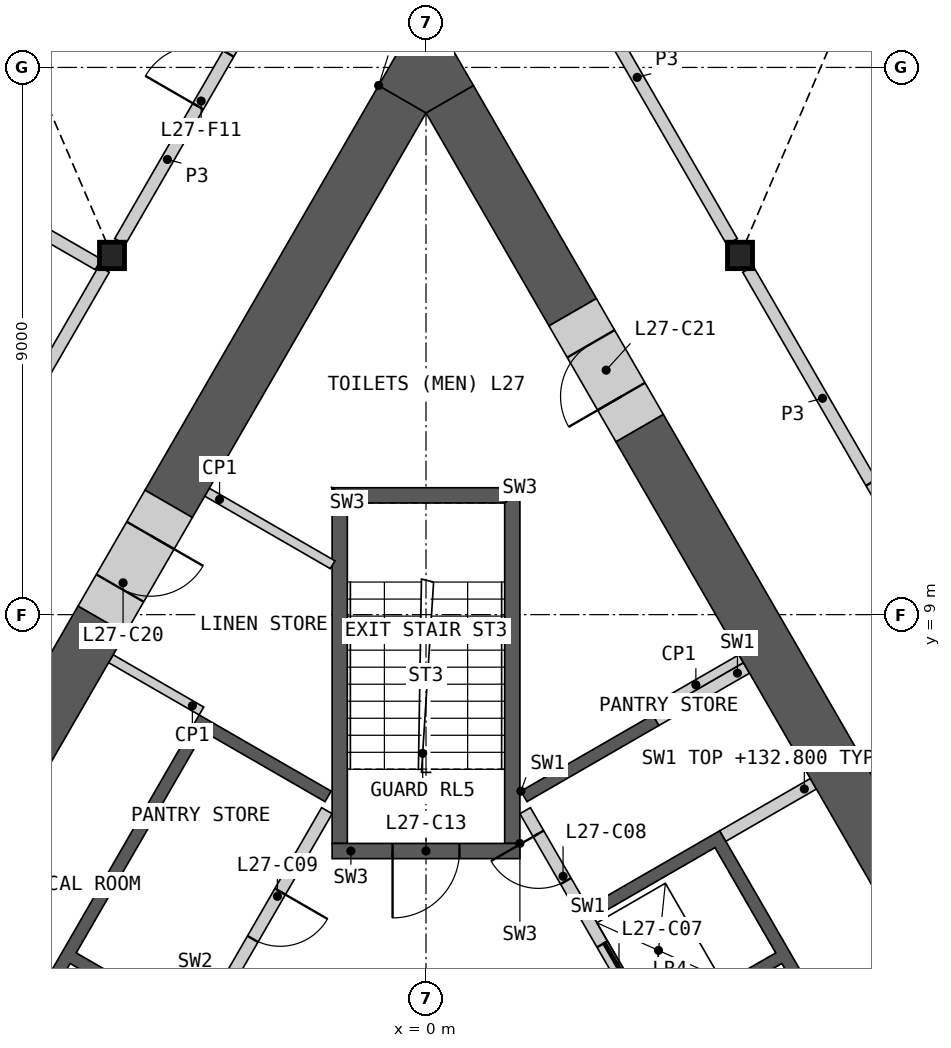
"""IFC4 building model, lengths in metres.
Left out: names, types, materials, properties, quantities, classifications, styles, units other than length and angle.
Written with IfcOpenShell. Run it as: python <this file> out.ifc"""

import sys

from ifc_helpers import new_model, si_unit, direction, frame, frame_2d, origin, origin_2d, place, context, subcontext, project, spatial, polyline, rectangle, i_section, outline, extrude, element, fill, save


model = new_model("IFC4")
c1 = context("Model", 3, precision=1e-05, world=origin(), true_north=direction((0.0, 1.0)))
c2 = subcontext(c1, "Body", "Model", "MODEL_VIEW")
j1 = project(units=[si_unit("LENGTHUNIT", "METRE"), si_unit("PLANEANGLEUNIT", "RADIAN")], contexts=[c1])
p1 = place(None, origin())
s1 = spatial("IfcSite", under=j1, at=p1, CompositionType="ELEMENT")
p2 = place(p1, origin())
s2 = spatial("IfcBuilding", under=s1, at=p2, CompositionType="ELEMENT")
p3 = place(p2, frame((0.0, 0.0, 129.0)))
s3 = spatial("IfcBuildingStorey", under=s2, at=p3, CompositionType="ELEMENT", Elevation=129.0)
for number, where, z_axis, x_axis in (
    (1, (-5.164, 14.908, 0.0), (0.0, 0.0, 1.0), (1.0, 0.0, 0.0)),
    (2, (5.164, 14.908, 0.0), (0.0, 0.0, 1.0), (1.0, 0.0, 0.0)),
):
    element("IfcColumn", number, at=place(p3, frame(where, z_axis=z_axis, x_axis=x_axis)), inside=s3, PredefinedType="COLUMN", context=c2, shape_type="SweptSolid", body=[
        extrude(i_section(OverallWidth=0.412, OverallDepth=0.435, WebThickness=0.036, FlangeThickness=0.057, at=origin_2d()), origin(), (0.0, 0.0, 1.0), 4.2),
    ])
p4 = place(p3, origin())
e3 = element("IfcWall", 3, at=p4, inside=s3, PredefinedType="SHEAR", context=c2, shape_type="SweptSolid", body=[
    extrude(outline(polyline([(1.561, 6.097), (3.731, 7.35), (3.831, 7.177), (1.66, 5.924), (1.561, 6.097)])), origin(), (0.0, 0.0, 1.0), 3.8),
])
p5 = place(p3, origin())
e4 = element("IfcWall", 4, at=p5, inside=s3, PredefinedType="SHEAR", context=c2, shape_type="SweptSolid", body=[
    extrude(outline(polyline([(2.66, 4.192), (4.831, 5.445), (8.231, -0.444), (6.061, -1.697), (5.96, -1.524), (7.952, -0.374), (6.952, 1.358), (4.96, 0.208), (4.861, 0.381), (6.852, 1.531), (5.852, 3.263), (3.861, 2.113), (3.76, 2.287), (5.752, 3.437), (4.752, 5.169), (2.76, 4.019), (2.66, 4.192)])), origin(), (0.0, 0.0, 1.0), 3.8),
])
p6 = place(p3, frame((5.817, -1.476, 0.0), z_axis=(0.0, 0.0, 1.0), x_axis=(-0.500002616675, 0.866023893041, 0.0)))
e5 = element("IfcWall", 5, at=p6, inside=s3, PredefinedType="SOLIDWALL", context=c2, shape_type="SweptSolid", body=[
    extrude(rectangle(XDim=8.373, YDim=0.2, at=frame_2d((4.187, 0.0))), origin(), (0.0, 0.0, 1.0), 3.8),
])
p7 = place(p6, frame((0.337, 0.0, 0.0)))
e6 = element("IfcOpeningElement", 6, at=p7, cuts=e5, PredefinedType="OPENING", context=c2, shape_type="SweptSolid", body=[
    extrude(rectangle(XDim=1.1, YDim=2.1, at=frame_2d((0.55, 1.05))), frame((0.0, 0.11, 0.0), z_axis=(0.0, -1.0, 0.0), x_axis=(1.0, 0.0, 0.0)), (0.0, 0.0, 1.0), 0.22),
])
p8 = place(p6, frame((2.537, 0.0, 0.0)))
e7 = element("IfcOpeningElement", 7, at=p8, cuts=e5, PredefinedType="OPENING", context=c2, shape_type="SweptSolid", body=[
    extrude(rectangle(XDim=1.1, YDim=2.1, at=frame_2d((0.55, 1.05))), frame((0.0, 0.11, 0.0), z_axis=(0.0, -1.0, 0.0), x_axis=(1.0, 0.0, 0.0)), (0.0, 0.0, 1.0), 0.22),
])
p9 = place(p6, frame((4.737, 0.0, 0.0)))
e8 = element("IfcOpeningElement", 8, at=p9, cuts=e5, PredefinedType="OPENING", context=c2, shape_type="SweptSolid", body=[
    extrude(rectangle(XDim=1.1, YDim=2.1, at=frame_2d((0.55, 1.05))), frame((0.0, 0.11, 0.0), z_axis=(0.0, -1.0, 0.0), x_axis=(1.0, 0.0, 0.0)), (0.0, 0.0, 1.0), 0.22),
])
p10 = place(p6, frame((7.037, 0.0, 0.0)))
e9 = element("IfcOpeningElement", 9, at=p10, cuts=e5, PredefinedType="OPENING", context=c2, shape_type="SweptSolid", body=[
    extrude(rectangle(XDim=0.9, YDim=2.1, at=frame_2d((0.45, 1.05))), frame((0.0, 0.11, 0.0), z_axis=(0.0, -1.0, 0.0), x_axis=(1.0, 0.0, 0.0)), (0.0, 0.0, 1.0), 0.22),
])
for number, where, z_axis, x_axis in (
    (10, (4.881, 5.358, 0.0), (0.0, 0.0, 1.0), (0.866, 0.5, 0.0)),
    (11, (3.781, 7.263, 0.0), (0.0, 0.0, 1.0), (0.866, 0.5, 0.0)),
):
    element("IfcWall", number, at=place(p3, frame(where, z_axis=z_axis, x_axis=x_axis)), inside=s3, PredefinedType="SHEAR", context=c2, shape_type="SweptSolid", body=[
        extrude(rectangle(XDim=1.72, YDim=0.2, at=frame_2d((0.86, 0.0))), origin(), (0.0, 0.0, 1.0), 3.8),
    ])
p11 = place(p3, origin())
e12 = element("IfcWall", 12, at=p11, inside=s3, PredefinedType="SHEAR", context=c2, shape_type="SweptSolid", body=[
    extrude(outline(polyline([(-4.96, 0.208), (-7.131, 1.461), (-3.731, 7.35), (-1.561, 6.097), (-1.66, 5.924), (-3.652, 7.074), (-5.752, 3.437), (-3.76, 2.287), (-3.861, 2.113), (-5.852, 3.263), (-6.852, 1.531), (-4.861, 0.381), (-4.96, 0.208)])), origin(), (0.0, 0.0, 1.0), 3.8),
])
p12 = place(p3, frame((-1.631, 5.776, 0.0), z_axis=(0.0, 0.0, 1.0), x_axis=(-0.499992876559, -0.866029516466, 0.0)))
e13 = element("IfcWall", 13, at=p12, inside=s3, PredefinedType="SOLIDWALL", context=c2, shape_type="SweptSolid", body=[
    extrude(rectangle(XDim=6.486, YDim=0.2, at=frame_2d((3.243, 0.0))), origin(), (0.0, 0.0, 1.0), 3.8),
])
p13 = place(p12, frame((1.537, 0.0, 0.0)))
e14 = element("IfcOpeningElement", 14, at=p13, cuts=e13, PredefinedType="OPENING", context=c2, shape_type="SweptSolid", body=[
    extrude(rectangle(XDim=0.9, YDim=2.1, at=frame_2d((0.45, 1.05))), frame((0.0, 0.11, 0.0), z_axis=(0.0, -1.0, 0.0), x_axis=(1.0, 0.0, 0.0)), (0.0, 0.0, 1.0), 0.22),
])
p14 = place(p3, origin())
e15 = element("IfcWall", 15, at=p14, inside=s3, PredefinedType="SHEAR", context=c2, shape_type="SweptSolid", body=[
    extrude(outline(polyline([(1.544, 5.237), (1.544, 11.087), (1.294, 10.837), (1.294, 5.237), (1.544, 5.237)])), origin(), (0.0, 0.0, 1.0), 3.8),
])
p15 = place(p3, origin())
e16 = element("IfcWall", 16, at=p15, inside=s3, PredefinedType="SHEAR", context=c2, shape_type="SweptSolid", body=[
    extrude(outline(polyline([(1.544, 11.087), (-1.544, 11.087), (-1.294, 10.837), (1.294, 10.837), (1.544, 11.087)])), origin(), (0.0, 0.0, 1.0), 3.8),
])
p16 = place(p3, origin())
e17 = element("IfcWall", 17, at=p16, inside=s3, PredefinedType="SHEAR", context=c2, shape_type="SweptSolid", body=[
    extrude(outline(polyline([(-1.294, 10.837), (-1.544, 11.087), (-1.544, 5.237), (-1.294, 5.237), (-1.294, 10.837)])), origin(), (0.0, 0.0, 1.0), 3.8),
])
p17 = place(p3, frame((1.544, 5.112, 0.0), z_axis=(0.0, 0.0, 1.0), x_axis=(-1.0, 0.0, 0.0)))
e18 = element("IfcWall", 18, at=p17, inside=s3, PredefinedType="SHEAR", context=c2, shape_type="SweptSolid", body=[
    extrude(rectangle(XDim=3.088, YDim=0.25, at=frame_2d((1.544, 0.0))), origin(), (0.0, 0.0, 1.0), 3.8),
])
p18 = place(p17, frame((0.994, 0.0, 0.0)))
e19 = element("IfcOpeningElement", 19, at=p18, cuts=e18, PredefinedType="OPENING", context=c2, shape_type="SweptSolid", body=[
    extrude(rectangle(XDim=1.1, YDim=2.1, at=frame_2d((0.55, 1.05))), frame((0.0, 0.135, 0.0), z_axis=(0.0, -1.0, 0.0), x_axis=(1.0, 0.0, 0.0)), (0.0, 0.0, 1.0), 0.27),
])
for number, where, z_axis, x_axis in (
    (20, (3.693, 7.415, 0.0), (0.0, 0.0, 1.0), (0.866, 0.5, 0.0)),
    (21, (-3.693, 7.415, 0.0), (0.0, 0.0, 1.0), (-0.866, 0.5, 0.0)),
):
    element("IfcWall", number, at=place(p3, frame(where, z_axis=z_axis, x_axis=x_axis)), inside=s3, PredefinedType="PARTITIONING", context=c2, shape_type="SweptSolid", body=[
        extrude(rectangle(XDim=1.72, YDim=0.15, at=frame_2d((0.86, 0.0))), origin(), (0.0, 0.0, 1.0), 3.8),
    ])
p19 = place(p3, frame((-3.602, 11.014, 0.0), z_axis=(0.0, 0.0, 1.0), x_axis=(0.866011787705, -0.500023583, 0.0)))
e22 = element("IfcWall", 22, at=p19, inside=s3, PredefinedType="PARTITIONING", context=c2, shape_type="SweptSolid", body=[
    extrude(rectangle(XDim=2.386, YDim=0.15, at=frame_2d((1.193, 0.0))), origin(), (0.0, 0.0, 1.0), 3.8),
])
p20 = place(p3, frame((7.91, 4.451, 0.0), z_axis=(0.0, 0.0, 1.0), x_axis=(-0.500001962043, 0.866024270995, 0.0)))
e23 = element("IfcWall", 23, at=p20, inside=s3, PredefinedType="SHEAR", context=c2, shape_type="SweptSolid", body=[
    extrude(rectangle(XDim=8.796, YDim=0.9, at=frame_2d((4.398, 0.0))), origin(), (0.0, 0.0, 1.0), 3.8),
])
p21 = place(p3, frame((2.413, 13.974, 0.0), z_axis=(0.0, 0.0, 1.0), x_axis=(-0.500046330384, 0.865998653272, 0.0)))
e24 = element("IfcWall", 24, at=p21, inside=s3, PredefinedType="SHEAR", context=c2, shape_type="SweptSolid", body=[
    extrude(rectangle(XDim=4.045, YDim=0.9, at=frame_2d((2.023, 0.0))), origin(), (0.0, 0.0, 1.0), 3.8),
])
p22 = place(p3, frame((-0.39, 17.478, 0.0), z_axis=(0.0, 0.0, 1.0), x_axis=(-0.500010285023, -0.866019465642, 0.0)))
e25 = element("IfcWall", 25, at=p22, inside=s3, PredefinedType="SHEAR", context=c2, shape_type="SweptSolid", body=[
    extrude(rectangle(XDim=7.685, YDim=0.9, at=frame_2d((3.842, 0.0))), origin(), (0.0, 0.0, 1.0), 3.8),
])
p23 = place(p3, frame((-5.332, 8.917, 0.0), z_axis=(0.0, 0.0, 1.0), x_axis=(-0.499949934511, -0.866054307178, 0.0)))
e26 = element("IfcWall", 26, at=p23, inside=s3, PredefinedType="SHEAR", context=c2, shape_type="SweptSolid", body=[
    extrude(rectangle(XDim=2.756, YDim=0.9, at=frame_2d((1.378, 0.0))), origin(), (0.0, 0.0, 1.0), 3.8),
])
p24 = place(p3, origin())
e27 = element("IfcWall", 27, at=p24, inside=s3, PredefinedType="SHEAR", context=c2, shape_type="SweptSolid", body=[
    extrude(outline(polyline([(-0.779, 17.703), (0.0, 19.052), (0.779, 17.703), (0.0, 17.253), (-0.779, 17.703)])), origin(), (0.0, 0.0, 1.0), 3.8),
])
p25 = place(p3, frame((-4.232, 10.822, 0.0), z_axis=(0.0, 0.0, 1.0), x_axis=(-0.50002983664, -0.866008176907, 0.0)))
e28 = element("IfcWall", 28, at=p25, inside=s3, PredefinedType="SHEAR", context=c2, shape_type="SweptSolid", body=[
    extrude(rectangle(XDim=2.2, YDim=0.9, at=frame_2d((1.1, 0.0))), origin(), (0.0, 0.0, 1.0), 3.8),
])
p26 = place(p25, frame((0.6, 0.0, 0.0)))
e29 = element("IfcOpeningElement", 29, at=p26, cuts=e28, PredefinedType="OPENING", context=c2, shape_type="SweptSolid", body=[
    extrude(rectangle(XDim=1.0, YDim=2.1, at=frame_2d((0.5, 1.05))), frame((0.0, 0.46, 0.0), z_axis=(0.0, -1.0, 0.0), x_axis=(1.0, 0.0, 0.0)), (0.0, 0.0, 1.0), 0.92),
])
p27 = place(p3, frame((3.512, 12.069, 0.0), z_axis=(0.0, 0.0, 1.0), x_axis=(-0.499946605688, 0.86605622881, 0.0)))
e30 = element("IfcWall", 30, at=p27, inside=s3, PredefinedType="SHEAR", context=c2, shape_type="SweptSolid", body=[
    extrude(rectangle(XDim=2.2, YDim=0.9, at=frame_2d((1.1, 0.0))), origin(), (0.0, 0.0, 1.0), 3.8),
])
p28 = place(p27, frame((0.6, 0.0, 0.0)))
e31 = element("IfcOpeningElement", 31, at=p28, cuts=e30, PredefinedType="OPENING", context=c2, shape_type="SweptSolid", body=[
    extrude(rectangle(XDim=1.0, YDim=2.1, at=frame_2d((0.5, 1.05))), frame((0.0, 0.46, 0.0), z_axis=(0.0, -1.0, 0.0), x_axis=(1.0, 0.0, 0.0)), (0.0, 0.0, 1.0), 0.92),
])
p29 = place(p3, frame((5.295, 14.68, 0.0), z_axis=(0.0, 0.0, 1.0), x_axis=(0.500012035596, -0.866018454918, 0.0)))
e32 = element("IfcWall", 32, at=p29, inside=s3, PredefinedType="PARTITIONING", context=c2, shape_type="SweptSolid", body=[
    extrude(rectangle(XDim=9.803, YDim=0.2, at=frame_2d((4.902, 0.0))), origin(), (0.0, 0.0, 1.0), 3.8),
])
p30 = place(p29, frame((4.052, 0.0, 0.0)))
e33 = element("IfcOpeningElement", 33, at=p30, cuts=e32, PredefinedType="OPENING", context=c2, shape_type="SweptSolid", body=[
    extrude(rectangle(XDim=1.8, YDim=2.1, at=frame_2d((0.9, 1.05))), frame((0.0, 0.11, 0.0), z_axis=(0.0, -1.0, 0.0), x_axis=(1.0, 0.0, 0.0)), (0.0, 0.0, 1.0), 0.22),
])
p31 = place(p3, frame((-10.197, 6.19, 0.0), z_axis=(0.0, 0.0, 1.0), x_axis=(0.500012035596, 0.866018454918, 0.0)))
e34 = element("IfcWall", 34, at=p31, inside=s3, PredefinedType="PARTITIONING", context=c2, shape_type="SweptSolid", body=[
    extrude(rectangle(XDim=9.803, YDim=0.2, at=frame_2d((4.902, 0.0))), origin(), (0.0, 0.0, 1.0), 3.8),
])
p32 = place(p31, frame((4.452, 0.0, 0.0)))
e35 = element("IfcOpeningElement", 35, at=p32, cuts=e34, PredefinedType="OPENING", context=c2, shape_type="SweptSolid", body=[
    extrude(rectangle(XDim=1.0, YDim=2.1, at=frame_2d((0.5, 1.05))), frame((0.0, 0.11, 0.0), z_axis=(0.0, -1.0, 0.0), x_axis=(1.0, 0.0, 0.0)), (0.0, 0.0, 1.0), 0.22),
])
p33 = place(p3, frame((-5.033, 15.135, 0.0), z_axis=(0.0, 0.0, 1.0), x_axis=(0.499980978912, 0.866036385336, 0.0)))
e36 = element("IfcWall", 36, at=p33, inside=s3, PredefinedType="PARTITIONING", context=c2, shape_type="SweptSolid", body=[
    extrude(rectangle(XDim=6.24, YDim=0.2, at=frame_2d((3.12, 0.0))), origin(), (0.0, 0.0, 1.0), 3.8),
])
p34 = place(p33, frame((2.57, 0.0, 0.0)))
e37 = element("IfcOpeningElement", 37, at=p34, cuts=e36, PredefinedType="OPENING", context=c2, shape_type="SweptSolid", body=[
    extrude(rectangle(XDim=1.0, YDim=2.1, at=frame_2d((0.5, 1.05))), frame((0.0, 0.11, 0.0), z_axis=(0.0, -1.0, 0.0), x_axis=(1.0, 0.0, 0.0)), (0.0, 0.0, 1.0), 0.22),
])
p35 = place(p3, frame((1.913, 20.539, 0.0), z_axis=(0.0, 0.0, 1.0), x_axis=(0.499980978912, -0.866036385336, 0.0)))
e38 = element("IfcWall", 38, at=p35, inside=s3, PredefinedType="PARTITIONING", context=c2, shape_type="SweptSolid", body=[
    extrude(rectangle(XDim=6.24, YDim=0.2, at=frame_2d((3.12, 0.0))), origin(), (0.0, 0.0, 1.0), 3.8),
])
p36 = place(p3, frame((-16.436, 21.137, 0.0), z_axis=(0.0, 0.0, 1.0), x_axis=(0.866023321739, -0.500003606191, 0.0)))
e39 = element("IfcWall", 39, at=p36, inside=s3, PredefinedType="PARTITIONING", context=c2, shape_type="SweptSolid", body=[
    extrude(rectangle(XDim=12.753, YDim=0.2, at=frame_2d((6.377, 0.0))), origin(), (0.0, 0.0, 1.0), 2.885),
])
p37 = place(p9, origin())
e40 = element("IfcDoor", 40, at=p37, inside=s3, OperationType="SLIDING_TO_LEFT", PredefinedType="DOOR", context=c2, shape_type="SweptSolid", body=[
    extrude(rectangle(XDim=1.1, YDim=2.1, at=frame_2d((0.55, 1.05))), frame((0.0, 0.025, 0.0), z_axis=(0.0, -1.0, 0.0), x_axis=(1.0, 0.0, 0.0)), (0.0, 0.0, 1.0), 0.05),
])
fill(e8, e40)
p38 = place(p10, origin())
e41 = element("IfcDoor", 41, at=p38, inside=s3, OperationType="SINGLE_SWING_RIGHT", PredefinedType="DOOR", context=c2, shape_type="SweptSolid", body=[
    extrude(rectangle(XDim=0.9, YDim=2.1, at=frame_2d((0.45, 1.05))), frame((0.0, 0.025, 0.0), z_axis=(0.0, -1.0, 0.0), x_axis=(1.0, 0.0, 0.0)), (0.0, 0.0, 1.0), 0.05),
])
fill(e9, e41)
p39 = place(p13, origin())
e42 = element("IfcDoor", 42, at=p39, inside=s3, OperationType="SINGLE_SWING_LEFT", PredefinedType="DOOR", context=c2, shape_type="SweptSolid", body=[
    extrude(rectangle(XDim=0.9, YDim=2.1, at=frame_2d((0.45, 1.05))), frame((0.0, 0.025, 0.0), z_axis=(0.0, -1.0, 0.0), x_axis=(1.0, 0.0, 0.0)), (0.0, 0.0, 1.0), 0.05),
])
fill(e14, e42)
p40 = place(p18, origin())
e43 = element("IfcDoor", 43, at=p40, inside=s3, OperationType="SINGLE_SWING_RIGHT", PredefinedType="DOOR", context=c2, shape_type="SweptSolid", body=[
    extrude(rectangle(XDim=1.1, YDim=2.1, at=frame_2d((0.55, 1.05))), frame((0.0, 0.025, 0.0), z_axis=(0.0, -1.0, 0.0), x_axis=(1.0, 0.0, 0.0)), (0.0, 0.0, 1.0), 0.05),
])
fill(e19, e43)
p41 = place(p26, origin())
e44 = element("IfcDoor", 44, at=p41, inside=s3, OperationType="SINGLE_SWING_LEFT", PredefinedType="DOOR", context=c2, shape_type="SweptSolid", body=[
    extrude(rectangle(XDim=1.0, YDim=2.1, at=frame_2d((0.5, 1.05))), frame((0.0, 0.205, 0.0), z_axis=(0.0, -1.0, 0.0), x_axis=(1.0, 0.0, 0.0)), (0.0, 0.0, 1.0), 0.05),
])
fill(e29, e44)
p42 = place(p28, origin())
e45 = element("IfcDoor", 45, at=p42, inside=s3, OperationType="SINGLE_SWING_LEFT", PredefinedType="DOOR", context=c2, shape_type="SweptSolid", body=[
    extrude(rectangle(XDim=1.0, YDim=2.1, at=frame_2d((0.5, 1.05))), frame((0.0, 0.205, 0.0), z_axis=(0.0, -1.0, 0.0), x_axis=(1.0, 0.0, 0.0)), (0.0, 0.0, 1.0), 0.05),
])
fill(e31, e45)
p43 = place(p30, origin())
e46 = element("IfcDoor", 46, at=p43, inside=s3, OperationType="DOUBLE_DOOR_SINGLE_SWING", PredefinedType="DOOR", context=c2, shape_type="SweptSolid", body=[
    extrude(rectangle(XDim=1.8, YDim=2.1, at=frame_2d((0.9, 1.05))), frame((0.0, 0.025, 0.0), z_axis=(0.0, -1.0, 0.0), x_axis=(1.0, 0.0, 0.0)), (0.0, 0.0, 1.0), 0.05),
])
fill(e33, e46)
p44 = place(p34, origin())
e47 = element("IfcDoor", 47, at=p44, inside=s3, OperationType="SINGLE_SWING_LEFT", PredefinedType="DOOR", context=c2, shape_type="SweptSolid", body=[
    extrude(rectangle(XDim=1.0, YDim=2.1, at=frame_2d((0.5, 1.05))), frame((0.0, 0.025, 0.0), z_axis=(0.0, -1.0, 0.0), x_axis=(1.0, 0.0, 0.0)), (0.0, 0.0, 1.0), 0.05),
])
fill(e37, e47)
save(model, sys.argv[1])
